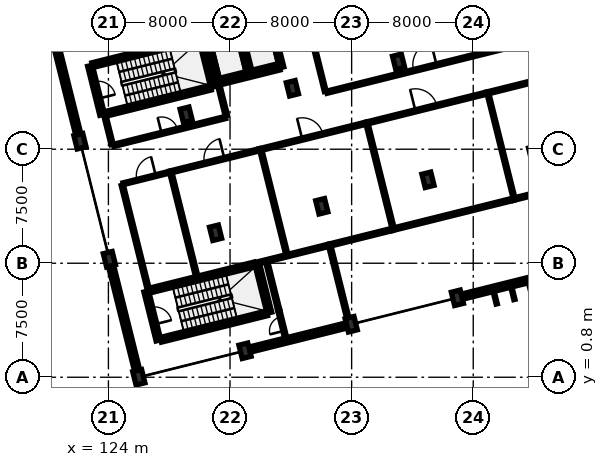
"""IFC4 building model, lengths in metres.
Left out: names, types, materials, properties, quantities, classifications, styles, units other than length and angle.
Written with IfcOpenShell. Run it as: python <this file> out.ifc"""

import sys

from ifc_helpers import new_model, si_unit, direction, frame, frame_2d, origin, origin_2d, place, context, subcontext, project, spatial, rectangle, extrude, element, fill, save


model = new_model("IFC4")
c1 = context("Model", 3, precision=1e-05, world=origin(), true_north=direction((0.0, 1.0)))
c2 = subcontext(c1, "Body", "Model", "MODEL_VIEW")
j1 = project(units=[si_unit("LENGTHUNIT", "METRE"), si_unit("PLANEANGLEUNIT", "RADIAN")], contexts=[c1])
p1 = place(None, origin())
s1 = spatial("IfcSite", under=j1, at=p1, CompositionType="ELEMENT")
p2 = place(p1, origin())
s2 = spatial("IfcBuilding", under=s1, at=p2, CompositionType="ELEMENT")
p3 = place(p2, frame((0.0, 0.0, 5.0)))
s3 = spatial("IfcBuildingStorey", under=s2, at=p3, CompositionType="ELEMENT", Elevation=5.0)
for number, where, z_axis, x_axis in (
    (1, (126.0, 0.8, 0.0), (0.0, 0.0, 1.0), (0.97, 0.242, 0.0)),
    (2, (124.065, 8.562, 0.0), (0.0, 0.0, 1.0), (0.97, 0.242, 0.0)),
    (3, (122.129, 16.325, 0.0), (0.0, 0.0, 1.0), (0.97, 0.242, 0.0)),
    (4, (132.986, 2.542, 0.0), (0.0, 0.0, 1.0), (0.97, 0.242, 0.0)),
    (5, (131.051, 10.304, 0.0), (0.0, 0.0, 1.0), (0.97, 0.242, 0.0)),
    (6, (129.115, 18.067, 0.0), (0.0, 0.0, 1.0), (0.97, 0.242, 0.0)),
    (7, (139.972, 4.284, 0.0), (0.0, 0.0, 1.0), (0.97, 0.242, 0.0)),
    (8, (138.037, 12.046, 0.0), (0.0, 0.0, 1.0), (0.97, 0.242, 0.0)),
    (9, (136.102, 19.808, 0.0), (0.0, 0.0, 1.0), (0.97, 0.242, 0.0)),
    (10, (146.958, 6.026, 0.0), (0.0, 0.0, 1.0), (0.97, 0.242, 0.0)),
    (11, (145.023, 13.788, 0.0), (0.0, 0.0, 1.0), (0.97, 0.242, 0.0)),
    (12, (143.088, 21.55, 0.0), (0.0, 0.0, 1.0), (0.97, 0.242, 0.0)),
):
    element("IfcColumn", number, at=place(p3, frame(where, z_axis=z_axis, x_axis=x_axis)), inside=s3, PredefinedType="COLUMN", context=c2, shape_type="SweptSolid", body=[
        extrude(rectangle(XDim=0.6, YDim=0.9, at=origin_2d()), origin(), (0.0, 0.0, 1.0), 4.2),
    ])
p4 = place(p3, frame((153.678, 7.701, 0.0), z_axis=(0.0, 0.0, 1.0), x_axis=(-0.970294050816, -0.241928615405, 0.0)))
e13 = element("IfcWall", 13, at=p4, inside=s3, PredefinedType="SOLIDWALL", context=c2, shape_type="SweptSolid", body=[
    extrude(rectangle(XDim=6.625, YDim=0.35, at=frame_2d((3.312, 0.0))), origin(), (0.0, 0.0, 1.0), 3.385),
])
p5 = place(p4, frame((2.688, 0.0, 0.9)))
e14 = element("IfcOpeningElement", 14, at=p5, cuts=e13, PredefinedType="OPENING", context=c2, shape_type="SweptSolid", body=[
    extrude(rectangle(XDim=1.25, YDim=1.7, at=frame_2d((0.625, 0.85))), frame((0.0, 0.187, 0.0), z_axis=(0.0, -1.0, 0.0), x_axis=(1.0, 0.0, 0.0)), (0.0, 0.0, 1.0), 0.374),
])
p6 = place(p3, frame((139.681, 4.211, 0.0), z_axis=(0.0, 0.0, 1.0), x_axis=(-0.970296792907, -0.241917617537, 0.0)))
e15 = element("IfcWall", 15, at=p6, inside=s3, PredefinedType="SOLIDWALL", context=c2, shape_type="SweptSolid", body=[
    extrude(rectangle(XDim=6.6, YDim=0.35, at=frame_2d((3.3, 0.0))), origin(), (0.0, 0.0, 1.0), 3.385),
])
p7 = place(p3, frame((125.891, 1.237, 0.0), z_axis=(0.0, 0.0, 1.0), x_axis=(-0.241904492141, 0.97030006528, 0.0)))
e16 = element("IfcWall", 16, at=p7, inside=s3, PredefinedType="SOLIDWALL", context=c2, shape_type="SweptSolid", body=[
    extrude(rectangle(XDim=7.1, YDim=0.35, at=frame_2d((3.55, 0.0))), origin(), (0.0, 0.0, 1.0), 3.485),
])
p8 = place(p7, frame((2.75, 0.0, 0.9)))
e17 = element("IfcOpeningElement", 17, at=p8, cuts=e16, PredefinedType="OPENING", context=c2, shape_type="SweptSolid", body=[
    extrude(rectangle(XDim=1.6, YDim=1.9, at=frame_2d((0.8, 0.95))), frame((0.0, 0.187, 0.0), z_axis=(0.0, -1.0, 0.0), x_axis=(1.0, 0.0, 0.0)), (0.0, 0.0, 1.0), 0.374),
])
p9 = place(p3, frame((122.02, 16.761, 0.0), z_axis=(0.0, 0.0, 1.0), x_axis=(-0.241912563448, 0.970298052995, 0.0)))
e18 = element("IfcWall", 18, at=p9, inside=s3, PredefinedType="SOLIDWALL", context=c2, shape_type="SweptSolid", body=[
    extrude(rectangle(XDim=7.1, YDim=0.35, at=frame_2d((3.55, 0.0))), origin(), (0.0, 0.0, 1.0), 3.485),
])
p10 = place(p3, frame((123.75, 18.11, 0.0), z_axis=(0.0, 0.0, 1.0), x_axis=(0.970294108333, 0.241928384724, 0.0)))
e19 = element("IfcWall", 19, at=p10, inside=s3, PredefinedType="SHEAR", context=c2, shape_type="SweptSolid", body=[
    extrude(rectangle(XDim=7.19, YDim=0.32, at=frame_2d((3.595, 0.0))), origin(), (0.0, 0.0, 1.0), 4.2),
])
p11 = place(p3, frame((130.887, 19.889, 0.0), z_axis=(0.0, 0.0, 1.0), x_axis=(-0.241947258837, 0.970289402158, 0.0)))
e20 = element("IfcWall", 20, at=p11, inside=s3, PredefinedType="SHEAR", context=c2, shape_type="SweptSolid", body=[
    extrude(rectangle(XDim=3.32, YDim=0.32, at=frame_2d((1.66, 0.0))), origin(), (0.0, 0.0, 1.0), 4.2),
])
p12 = place(p3, frame((129.924, 23.071, 0.0), z_axis=(0.0, 0.0, 1.0), x_axis=(-0.970294108333, -0.241928384724, 0.0)))
e21 = element("IfcWall", 21, at=p12, inside=s3, PredefinedType="SHEAR", context=c2, shape_type="SweptSolid", body=[
    extrude(rectangle(XDim=7.19, YDim=0.32, at=frame_2d((3.595, 0.0))), origin(), (0.0, 0.0, 1.0), 4.2),
])
p13 = place(p3, frame((122.787, 21.292, 0.0), z_axis=(0.0, 0.0, 1.0), x_axis=(0.241860763027, -0.970310966293, 0.0)))
e22 = element("IfcWall", 22, at=p13, inside=s3, PredefinedType="SHEAR", context=c2, shape_type="SweptSolid", body=[
    extrude(rectangle(XDim=3.32, YDim=0.32, at=frame_2d((1.66, 0.0))), origin(), (0.0, 0.0, 1.0), 4.2),
])
p14 = place(p13, frame((1.085, 0.0, 0.0)))
e23 = element("IfcOpeningElement", 23, at=p14, cuts=e22, PredefinedType="OPENING", context=c2, shape_type="SweptSolid", body=[
    extrude(rectangle(XDim=1.15, YDim=2.15, at=frame_2d((0.575, 1.075))), frame((0.0, 0.172, 0.0), z_axis=(0.0, -1.0, 0.0), x_axis=(1.0, 0.0, 0.0)), (0.0, 0.0, 1.0), 0.344),
])
p15 = place(p3, frame((131.363, 20.176, 0.0), z_axis=(0.0, 0.0, 1.0), x_axis=(0.970284587517, 0.241966566341, 0.0)))
e24 = element("IfcWall", 24, at=p15, inside=s3, PredefinedType="SHEAR", context=c2, shape_type="SweptSolid", body=[
    extrude(rectangle(XDim=1.817, YDim=0.28, at=frame_2d((0.909, 0.0))), origin(), (0.0, 0.0, 1.0), 4.2),
])
for number, where, z_axis, x_axis in (
    (25, (133.267, 20.651, 0.0), (0.0, 0.0, 1.0), (-0.242, 0.97, 0.0)),
    (26, (130.498, 23.046, 0.0), (0.0, 0.0, 1.0), (0.242, -0.97, 0.0)),
):
    element("IfcWall", number, at=place(p3, frame(where, z_axis=z_axis, x_axis=x_axis)), inside=s3, PredefinedType="SHEAR", context=c2, shape_type="SweptSolid", body=[
        extrude(rectangle(XDim=2.994, YDim=0.28, at=frame_2d((1.497, 0.0))), origin(), (0.0, 0.0, 1.0), 4.2),
    ])
p16 = place(p3, frame((133.408, 20.686, 0.0), z_axis=(0.0, 0.0, 1.0), x_axis=(0.970285190026, 0.241964150272, 0.0)))
e27 = element("IfcWall", 27, at=p16, inside=s3, PredefinedType="SHEAR", context=c2, shape_type="SweptSolid", body=[
    extrude(rectangle(XDim=1.91, YDim=0.28, at=frame_2d((0.955, 0.0))), origin(), (0.0, 0.0, 1.0), 4.2),
])
p17 = place(p3, frame((135.402, 21.183, 0.0), z_axis=(0.0, 0.0, 1.0), x_axis=(-0.241921647353, 0.970295788171, 0.0)))
e28 = element("IfcWall", 28, at=p17, inside=s3, PredefinedType="SHEAR", context=c2, shape_type="SweptSolid", body=[
    extrude(rectangle(XDim=2.994, YDim=0.28, at=frame_2d((1.497, 0.0))), origin(), (0.0, 0.0, 1.0), 4.2),
])
p18 = place(p3, frame((127.452, 3.264, 0.0), z_axis=(0.0, 0.0, 1.0), x_axis=(0.970294108333, 0.241928384724, 0.0)))
e29 = element("IfcWall", 29, at=p18, inside=s3, PredefinedType="SHEAR", context=c2, shape_type="SweptSolid", body=[
    extrude(rectangle(XDim=7.19, YDim=0.32, at=frame_2d((3.595, 0.0))), origin(), (0.0, 0.0, 1.0), 4.2),
])
p19 = place(p3, frame((134.588, 5.044, 0.0), z_axis=(0.0, 0.0, 1.0), x_axis=(-0.241929995817, 0.970293706629, 0.0)))
e30 = element("IfcWall", 30, at=p19, inside=s3, PredefinedType="SHEAR", context=c2, shape_type="SweptSolid", body=[
    extrude(rectangle(XDim=3.32, YDim=0.32, at=frame_2d((1.66, 0.0))), origin(), (0.0, 0.0, 1.0), 4.2),
])
p20 = place(p3, frame((133.625, 8.225, 0.0), z_axis=(0.0, 0.0, 1.0), x_axis=(-0.970294108333, -0.241928384724, 0.0)))
e31 = element("IfcWall", 31, at=p20, inside=s3, PredefinedType="SHEAR", context=c2, shape_type="SweptSolid", body=[
    extrude(rectangle(XDim=7.19, YDim=0.32, at=frame_2d((3.595, 0.0))), origin(), (0.0, 0.0, 1.0), 4.2),
])
p21 = place(p3, frame((126.489, 6.446, 0.0), z_axis=(0.0, 0.0, 1.0), x_axis=(0.241947258837, -0.970289402158, 0.0)))
e32 = element("IfcWall", 32, at=p21, inside=s3, PredefinedType="SHEAR", context=c2, shape_type="SweptSolid", body=[
    extrude(rectangle(XDim=3.32, YDim=0.32, at=frame_2d((1.66, 0.0))), origin(), (0.0, 0.0, 1.0), 4.2),
])
p22 = place(p21, frame((1.085, 0.0, 0.0)))
e33 = element("IfcOpeningElement", 33, at=p22, cuts=e32, PredefinedType="OPENING", context=c2, shape_type="SweptSolid", body=[
    extrude(rectangle(XDim=1.15, YDim=2.15, at=frame_2d((0.575, 1.075))), frame((0.0, 0.172, 0.0), z_axis=(0.0, -1.0, 0.0), x_axis=(1.0, 0.0, 0.0)), (0.0, 0.0, 1.0), 0.344),
])
p23 = place(p3, frame((124.346, 16.053, 0.0), z_axis=(0.0, 0.0, 1.0), x_axis=(0.970295772287, 0.241921711059, 0.0)))
e34 = element("IfcWall", 34, at=p23, inside=s3, PredefinedType="PARTITIONING", context=c2, shape_type="SweptSolid", body=[
    extrude(rectangle(XDim=7.58, YDim=0.15, at=frame_2d((3.79, 0.0))), origin(), (0.0, 0.0, 1.0), 3.385),
])
p24 = place(p23, frame((3.25, 0.0, 0.0)))
e35 = element("IfcOpeningElement", 35, at=p24, cuts=e34, PredefinedType="OPENING", context=c2, shape_type="SweptSolid", body=[
    extrude(rectangle(XDim=1.08, YDim=2.18, at=frame_2d((0.54, 1.09))), frame((0.0, 0.087, 0.0), z_axis=(0.0, -1.0, 0.0), x_axis=(1.0, 0.0, 0.0)), (0.0, 0.0, 1.0), 0.174),
])
p25 = place(p3, frame((135.658, 3.401, 0.0), z_axis=(0.0, 0.0, 1.0), x_axis=(-0.241923827719, 0.970295244543, 0.0)))
e36 = element("IfcWall", 36, at=p25, inside=s3, PredefinedType="PARTITIONING", context=c2, shape_type="SweptSolid", body=[
    extrude(rectangle(XDim=1.878, YDim=0.15, at=frame_2d((0.939, 0.0))), origin(), (0.0, 0.0, 1.0), 3.535),
])
p26 = place(p25, frame((0.464, 0.0, 0.0)))
e37 = element("IfcOpeningElement", 37, at=p26, cuts=e36, PredefinedType="OPENING", context=c2, shape_type="SweptSolid", body=[
    extrude(rectangle(XDim=0.95, YDim=2.15, at=frame_2d((0.475, 1.075))), frame((0.0, 0.087, 0.0), z_axis=(0.0, -1.0, 0.0), x_axis=(1.0, 0.0, 0.0)), (0.0, 0.0, 1.0), 0.174),
])
p27 = place(p3, frame((124.975, 13.53, 0.0), z_axis=(0.0, 0.0, 1.0), x_axis=(0.970289141252, 0.241948305158, 0.0)))
e38 = element("IfcWall", 38, at=p27, inside=s3, PredefinedType="PARTITIONING", context=c2, shape_type="SweptSolid", body=[
    extrude(rectangle(XDim=3.13, YDim=0.125, at=frame_2d((1.565, 0.0))), origin(), (0.0, 0.0, 1.0), 4.2),
])
p28 = place(p27, frame((0.925, 0.0, 0.0)))
e39 = element("IfcOpeningElement", 39, at=p28, cuts=e38, PredefinedType="OPENING", context=c2, shape_type="SweptSolid", body=[
    extrude(rectangle(XDim=1.28, YDim=2.22, at=frame_2d((0.64, 1.11))), frame((0.0, 0.074, 0.0), z_axis=(0.0, -1.0, 0.0), x_axis=(1.0, 0.0, 0.0)), (0.0, 0.0, 1.0), 0.149),
])
p29 = place(p3, frame((128.023, 14.29, 0.0), z_axis=(0.0, 0.0, 1.0), x_axis=(0.970293282145, 0.241931698263, 0.0)))
e40 = element("IfcWall", 40, at=p29, inside=s3, PredefinedType="PARTITIONING", context=c2, shape_type="SweptSolid", body=[
    extrude(rectangle(XDim=6.088, YDim=0.15, at=frame_2d((3.044, 0.0))), origin(), (0.0, 0.0, 1.0), 3.385),
])
p30 = place(p29, frame((2.374, 0.0, 0.0)))
e41 = element("IfcOpeningElement", 41, at=p30, cuts=e40, PredefinedType="OPENING", context=c2, shape_type="SweptSolid", body=[
    extrude(rectangle(XDim=1.34, YDim=2.24, at=frame_2d((0.67, 1.12))), frame((0.0, 0.087, 0.0), z_axis=(0.0, -1.0, 0.0), x_axis=(1.0, 0.0, 0.0)), (0.0, 0.0, 1.0), 0.174),
])
p31 = place(p3, frame((133.942, 15.766, 0.0), z_axis=(0.0, 0.0, 1.0), x_axis=(0.970292162734, 0.241936187739, 0.0)))
e42 = element("IfcWall", 42, at=p31, inside=s3, PredefinedType="PARTITIONING", context=c2, shape_type="SweptSolid", body=[
    extrude(rectangle(XDim=7.188, YDim=0.15, at=frame_2d((3.594, 0.0))), origin(), (0.0, 0.0, 1.0), 3.385),
])
p32 = place(p31, frame((2.894, 0.0, 0.0)))
e43 = element("IfcOpeningElement", 43, at=p32, cuts=e42, PredefinedType="OPENING", context=c2, shape_type="SweptSolid", body=[
    extrude(rectangle(XDim=1.4, YDim=2.25, at=frame_2d((0.7, 1.125))), frame((0.0, 0.087, 0.0), z_axis=(0.0, -1.0, 0.0), x_axis=(1.0, 0.0, 0.0)), (0.0, 0.0, 1.0), 0.174),
])
p33 = place(p3, frame((140.928, 17.508, 0.0), z_axis=(0.0, 0.0, 1.0), x_axis=(0.970293149657, 0.241932229621, 0.0)))
e44 = element("IfcWall", 44, at=p33, inside=s3, PredefinedType="PARTITIONING", context=c2, shape_type="SweptSolid", body=[
    extrude(rectangle(XDim=8.188, YDim=0.15, at=frame_2d((4.094, 0.0))), origin(), (0.0, 0.0, 1.0), 3.385),
])
p34 = place(p33, frame((3.369, 0.0, 0.0)))
e45 = element("IfcOpeningElement", 45, at=p34, cuts=e44, PredefinedType="OPENING", context=c2, shape_type="SweptSolid", body=[
    extrude(rectangle(XDim=1.45, YDim=2.26, at=frame_2d((0.725, 1.13))), frame((0.0, 0.087, 0.0), z_axis=(0.0, -1.0, 0.0), x_axis=(1.0, 0.0, 0.0)), (0.0, 0.0, 1.0), 0.174),
])
p35 = place(p3, frame((148.885, 19.491, 0.0), z_axis=(0.0, 0.0, 1.0), x_axis=(0.970294203895, 0.241928001454, 0.0)))
e46 = element("IfcWall", 46, at=p35, inside=s3, PredefinedType="PARTITIONING", context=c2, shape_type="SweptSolid", body=[
    extrude(rectangle(XDim=9.171, YDim=0.15, at=frame_2d((4.585, 0.0))), origin(), (0.0, 0.0, 1.0), 3.485),
])
p36 = place(p35, frame((3.835, 0.0, 0.0)))
e47 = element("IfcOpeningElement", 47, at=p36, cuts=e46, PredefinedType="OPENING", context=c2, shape_type="SweptSolid", body=[
    extrude(rectangle(XDim=1.5, YDim=2.28, at=frame_2d((0.75, 1.14))), frame((0.0, 0.087, 0.0), z_axis=(0.0, -1.0, 0.0), x_axis=(1.0, 0.0, 0.0)), (0.0, 0.0, 1.0), 0.174),
])
p37 = place(p3, frame((138.367, 19.549, 0.0), z_axis=(0.0, 0.0, 1.0), x_axis=(0.970292357867, 0.241935405151, 0.0)))
e48 = element("IfcWall", 48, at=p37, inside=s3, PredefinedType="PARTITIONING", context=c2, shape_type="SweptSolid", body=[
    extrude(rectangle(XDim=12.06, YDim=0.15, at=frame_2d((6.03, 0.0))), origin(), (0.0, 0.0, 1.0), 3.385),
])
p38 = place(p37, frame((5.88, 0.0, 0.0)))
e49 = element("IfcOpeningElement", 49, at=p38, cuts=e48, PredefinedType="OPENING", context=c2, shape_type="SweptSolid", body=[
    extrude(rectangle(XDim=1.56, YDim=2.3, at=frame_2d((0.78, 1.15))), frame((0.0, 0.087, 0.0), z_axis=(0.0, -1.0, 0.0), x_axis=(1.0, 0.0, 0.0)), (0.0, 0.0, 1.0), 0.174),
])
p39 = place(p3, frame((124.243, 16.115, 0.0), z_axis=(0.0, 0.0, 1.0), x_axis=(-0.24202255973, 0.970270622343, 0.0)))
e50 = element("IfcWall", 50, at=p39, inside=s3, PredefinedType="PARTITIONING", context=c2, shape_type="SweptSolid", body=[
    extrude(rectangle(XDim=1.792, YDim=0.15, at=frame_2d((0.896, 0.0))), origin(), (0.0, 0.0, 1.0), 3.485),
])
p40 = place(p3, frame((131.763, 17.99, 0.0), z_axis=(0.0, 0.0, 1.0), x_axis=(-0.241962612769, 0.970285573438, 0.0)))
e51 = element("IfcWall", 51, at=p40, inside=s3, PredefinedType="PARTITIONING", context=c2, shape_type="SweptSolid", body=[
    extrude(rectangle(XDim=2.206, YDim=0.16, at=frame_2d((1.103, 0.0))), origin(), (0.0, 0.0, 1.0), 3.485),
])
p41 = place(p3, frame((133.627, 8.267, 0.0), z_axis=(0.0, 0.0, 1.0), x_axis=(0.970303519327, 0.241890637233, 0.0)))
e52 = element("IfcWall", 52, at=p41, inside=s3, PredefinedType="PARTITIONING", context=c2, shape_type="SweptSolid", body=[
    extrude(rectangle(XDim=4.988, YDim=0.16, at=frame_2d((2.494, 0.0))), origin(), (0.0, 0.0, 1.0), 3.385),
])
p42 = place(p3, frame((135.2, 5.235, 0.0), z_axis=(0.0, 0.0, 1.0), x_axis=(-0.241877725159, 0.970306738136, 0.0)))
e53 = element("IfcWall", 53, at=p42, inside=s3, PredefinedType="PARTITIONING", context=c2, shape_type="SweptSolid", body=[
    extrude(rectangle(XDim=3.231, YDim=0.15, at=frame_2d((1.615, 0.0))), origin(), (0.0, 0.0, 1.0), 4.2),
])
p43 = place(p3, frame((139.766, 4.615, 0.0), z_axis=(0.0, 0.0, 1.0), x_axis=(-0.241908041606, 0.970299180359, 0.0)))
e54 = element("IfcWall", 54, at=p43, inside=s3, PredefinedType="PARTITIONING", context=c2, shape_type="SweptSolid", body=[
    extrude(rectangle(XDim=4.943, YDim=0.16, at=frame_2d((2.472, 0.0))), origin(), (0.0, 0.0, 1.0), 3.385),
])
p44 = place(p3, frame((126.58, 6.74, 0.0), z_axis=(0.0, 0.0, 1.0), x_axis=(-0.24192707633, 0.97029443456, 0.0)))
e55 = element("IfcWall", 55, at=p44, inside=s3, PredefinedType="PARTITIONING", context=c2, shape_type="SweptSolid", body=[
    extrude(rectangle(XDim=6.892, YDim=0.15, at=frame_2d((3.446, 0.0))), origin(), (0.0, 0.0, 1.0), 3.485),
])
p45 = place(p3, frame((129.804, 7.45, 0.0), z_axis=(0.0, 0.0, 1.0), x_axis=(-0.241910170124, 0.97029864969, 0.0)))
e56 = element("IfcWall", 56, at=p45, inside=s3, PredefinedType="PARTITIONING", context=c2, shape_type="SweptSolid", body=[
    extrude(rectangle(XDim=6.981, YDim=0.16, at=frame_2d((3.49, 0.0))), origin(), (0.0, 0.0, 1.0), 3.485),
])
p46 = place(p3, frame((135.733, 8.887, 0.0), z_axis=(0.0, 0.0, 1.0), x_axis=(-0.241913757308, 0.970297755344, 0.0)))
e57 = element("IfcWall", 57, at=p46, inside=s3, PredefinedType="PARTITIONING", context=c2, shape_type="SweptSolid", body=[
    extrude(rectangle(XDim=7.021, YDim=0.15, at=frame_2d((3.51, 0.0))), origin(), (0.0, 0.0, 1.0), 3.485),
])
p47 = place(p3, frame((138.479, 9.477, 0.0), z_axis=(0.0, 0.0, 1.0), x_axis=(0.970295647322, 0.241922212266, 0.0)))
e58 = element("IfcWall", 58, at=p47, inside=s3, PredefinedType="PARTITIONING", context=c2, shape_type="SweptSolid", body=[
    extrude(rectangle(XDim=4.308, YDim=0.16, at=frame_2d((2.154, 0.0))), origin(), (0.0, 0.0, 1.0), 3.385),
])
p48 = place(p3, frame((142.72, 10.622, 0.0), z_axis=(0.0, 0.0, 1.0), x_axis=(-0.241914380839, 0.970297599885, 0.0)))
e59 = element("IfcWall", 59, at=p48, inside=s3, PredefinedType="PARTITIONING", context=c2, shape_type="SweptSolid", body=[
    extrude(rectangle(XDim=7.028, YDim=0.15, at=frame_2d((3.514, 0.0))), origin(), (0.0, 0.0, 1.0), 3.485),
])
p49 = place(p3, frame((142.67, 10.522, 0.0), z_axis=(0.0, 0.0, 1.0), x_axis=(0.970298403727, 0.241911156677, 0.0)))
e60 = element("IfcWall", 60, at=p49, inside=s3, PredefinedType="PARTITIONING", context=c2, shape_type="SweptSolid", body=[
    extrude(rectangle(XDim=8.188, YDim=0.16, at=frame_2d((4.094, 0.0))), origin(), (0.0, 0.0, 1.0), 3.385),
])
p50 = place(p3, frame((150.677, 12.605, 0.0), z_axis=(0.0, 0.0, 1.0), x_axis=(-0.241914380839, 0.970297599885, 0.0)))
e61 = element("IfcWall", 61, at=p50, inside=s3, PredefinedType="PARTITIONING", context=c2, shape_type="SweptSolid", body=[
    extrude(rectangle(XDim=7.028, YDim=0.125, at=frame_2d((3.514, 0.0))), origin(), (0.0, 0.0, 1.0), 3.485),
])
p51 = place(p3, frame((150.627, 12.505, 0.0), z_axis=(0.0, 0.0, 1.0), x_axis=(0.970292468543, 0.241934961279, 0.0)))
e62 = element("IfcWall", 62, at=p51, inside=s3, PredefinedType="PARTITIONING", context=c2, shape_type="SweptSolid", body=[
    extrude(rectangle(XDim=9.086, YDim=0.16, at=frame_2d((4.543, 0.0))), origin(), (0.0, 0.0, 1.0), 3.485),
])
p52 = place(p3, frame((138.264, 19.611, 0.0), z_axis=(0.0, 0.0, 1.0), x_axis=(-0.241920353256, 0.970296110824, 0.0)))
e63 = element("IfcWall", 63, at=p52, inside=s3, PredefinedType="PARTITIONING", context=c2, shape_type="SweptSolid", body=[
    extrude(rectangle(XDim=8.03, YDim=0.125, at=frame_2d((4.015, 0.0))), origin(), (0.0, 0.0, 1.0), 3.485),
])
p53 = place(p5, origin())
e64 = element("IfcWindow", 64, at=p53, inside=s3, PartitioningType="SINGLE_PANEL", PredefinedType="WINDOW", context=c2, shape_type="SweptSolid", body=[
    extrude(rectangle(XDim=1.25, YDim=1.7, at=frame_2d((0.625, 0.85))), frame((0.0, 0.03, 0.0), z_axis=(0.0, -1.0, 0.0), x_axis=(1.0, 0.0, 0.0)), (0.0, 0.0, 1.0), 0.06),
])
fill(e14, e64)
p54 = place(p8, origin())
e65 = element("IfcWindow", 65, at=p54, inside=s3, PartitioningType="DOUBLE_PANEL_VERTICAL", PredefinedType="WINDOW", context=c2, shape_type="SweptSolid", body=[
    extrude(rectangle(XDim=1.6, YDim=1.9, at=frame_2d((0.8, 0.95))), frame((0.0, 0.03, 0.0), z_axis=(0.0, -1.0, 0.0), x_axis=(1.0, 0.0, 0.0)), (0.0, 0.0, 1.0), 0.06),
])
fill(e17, e65)
p55 = place(p14, origin())
e66 = element("IfcDoor", 66, at=p55, inside=s3, OperationType="SINGLE_SWING_RIGHT", PredefinedType="DOOR", context=c2, shape_type="SweptSolid", body=[
    extrude(rectangle(XDim=1.15, YDim=2.15, at=frame_2d((0.575, 1.075))), frame((0.0, 0.025, 0.0), z_axis=(0.0, -1.0, 0.0), x_axis=(1.0, 0.0, 0.0)), (0.0, 0.0, 1.0), 0.05),
])
fill(e23, e66)
p56 = place(p22, origin())
e67 = element("IfcDoor", 67, at=p56, inside=s3, OperationType="SINGLE_SWING_RIGHT", PredefinedType="DOOR", context=c2, shape_type="SweptSolid", body=[
    extrude(rectangle(XDim=1.15, YDim=2.15, at=frame_2d((0.575, 1.075))), frame((0.0, 0.025, 0.0), z_axis=(0.0, -1.0, 0.0), x_axis=(1.0, 0.0, 0.0)), (0.0, 0.0, 1.0), 0.05),
])
fill(e33, e67)
p57 = place(p24, origin())
e68 = element("IfcDoor", 68, at=p57, inside=s3, OperationType="SINGLE_SWING_LEFT", PredefinedType="DOOR", context=c2, shape_type="SweptSolid", body=[
    extrude(rectangle(XDim=1.08, YDim=2.18, at=frame_2d((0.54, 1.09))), frame((0.0, 0.025, 0.0), z_axis=(0.0, -1.0, 0.0), x_axis=(1.0, 0.0, 0.0)), (0.0, 0.0, 1.0), 0.05),
])
fill(e35, e68)
p58 = place(p26, origin())
e69 = element("IfcDoor", 69, at=p58, inside=s3, OperationType="SINGLE_SWING_LEFT", PredefinedType="DOOR", context=c2, shape_type="SweptSolid", body=[
    extrude(rectangle(XDim=0.95, YDim=2.15, at=frame_2d((0.475, 1.075))), frame((0.0, 0.025, 0.0), z_axis=(0.0, -1.0, 0.0), x_axis=(1.0, 0.0, 0.0)), (0.0, 0.0, 1.0), 0.05),
])
fill(e37, e69)
p59 = place(p28, origin())
e70 = element("IfcDoor", 70, at=p59, inside=s3, OperationType="SINGLE_SWING_RIGHT", PredefinedType="DOOR", context=c2, shape_type="SweptSolid", body=[
    extrude(rectangle(XDim=1.28, YDim=2.22, at=frame_2d((0.64, 1.11))), frame((0.0, 0.025, 0.0), z_axis=(0.0, -1.0, 0.0), x_axis=(1.0, 0.0, 0.0)), (0.0, 0.0, 1.0), 0.05),
])
fill(e39, e70)
p60 = place(p30, origin())
e71 = element("IfcDoor", 71, at=p60, inside=s3, OperationType="SINGLE_SWING_RIGHT", PredefinedType="DOOR", context=c2, shape_type="SweptSolid", body=[
    extrude(rectangle(XDim=1.34, YDim=2.24, at=frame_2d((0.67, 1.12))), frame((0.0, 0.025, 0.0), z_axis=(0.0, -1.0, 0.0), x_axis=(1.0, 0.0, 0.0)), (0.0, 0.0, 1.0), 0.05),
])
fill(e41, e71)
p61 = place(p32, origin())
e72 = element("IfcDoor", 72, at=p61, inside=s3, OperationType="SINGLE_SWING_LEFT", PredefinedType="DOOR", context=c2, shape_type="SweptSolid", body=[
    extrude(rectangle(XDim=1.4, YDim=2.25, at=frame_2d((0.7, 1.125))), frame((0.0, 0.025, 0.0), z_axis=(0.0, -1.0, 0.0), x_axis=(1.0, 0.0, 0.0)), (0.0, 0.0, 1.0), 0.05),
])
fill(e43, e72)
p62 = place(p34, origin())
e73 = element("IfcDoor", 73, at=p62, inside=s3, OperationType="SINGLE_SWING_LEFT", PredefinedType="DOOR", context=c2, shape_type="SweptSolid", body=[
    extrude(rectangle(XDim=1.45, YDim=2.26, at=frame_2d((0.725, 1.13))), frame((0.0, 0.025, 0.0), z_axis=(0.0, -1.0, 0.0), x_axis=(1.0, 0.0, 0.0)), (0.0, 0.0, 1.0), 0.05),
])
fill(e45, e73)
p63 = place(p38, origin())
e74 = element("IfcDoor", 74, at=p63, inside=s3, OperationType="SINGLE_SWING_RIGHT", PredefinedType="DOOR", context=c2, shape_type="SweptSolid", body=[
    extrude(rectangle(XDim=1.56, YDim=2.3, at=frame_2d((0.78, 1.15))), frame((0.0, 0.025, 0.0), z_axis=(0.0, -1.0, 0.0), x_axis=(1.0, 0.0, 0.0)), (0.0, 0.0, 1.0), 0.05),
])
fill(e49, e74)
save(model, sys.argv[1])
